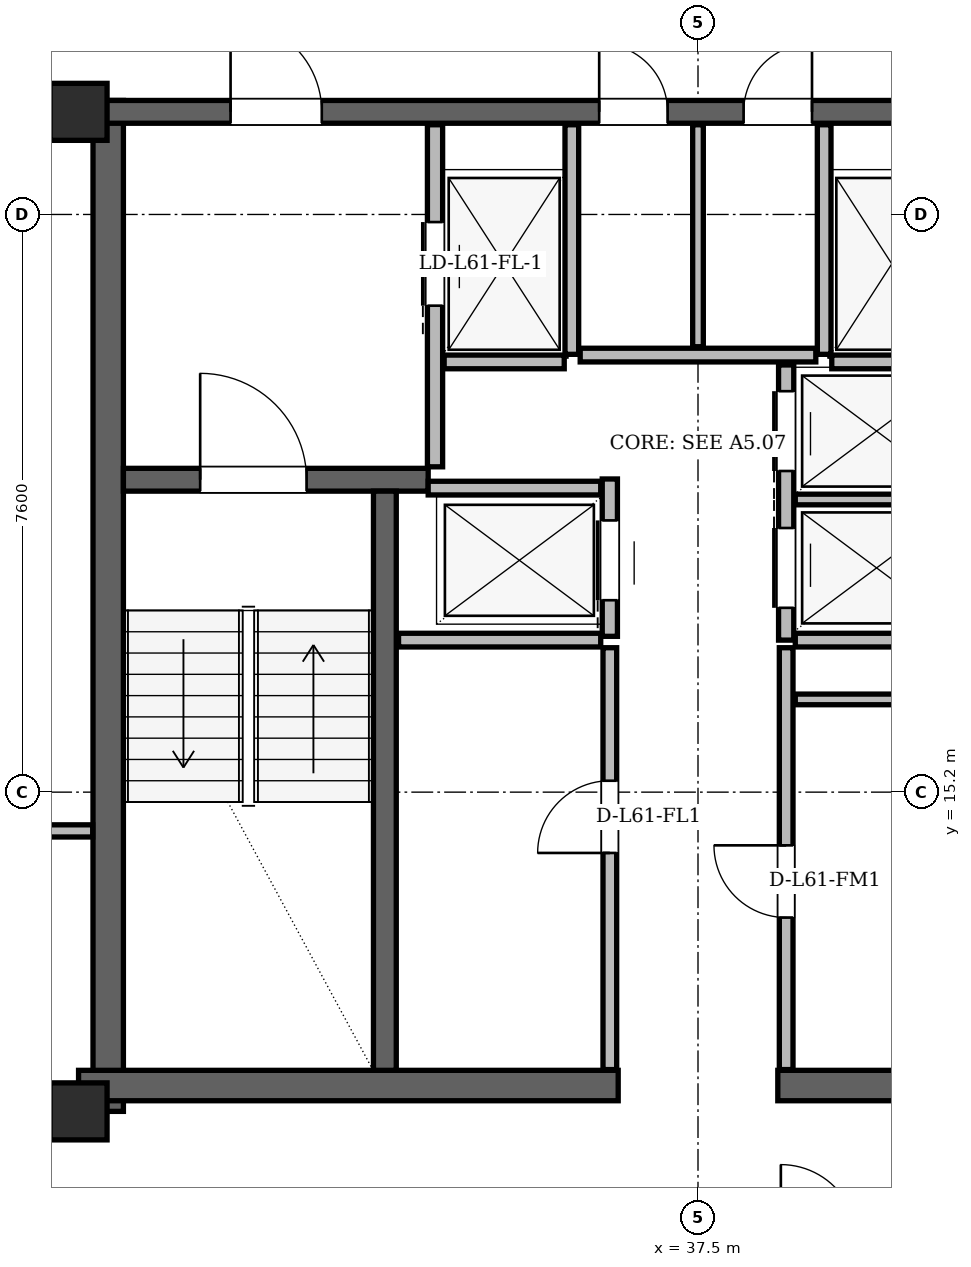
"""IFC4 building model, lengths in metres.
Left out: names, types, materials, properties, quantities, classifications, styles, units other than length and angle.
Written with IfcOpenShell. Run it as: python <this file> out.ifc"""

import sys

from ifc_helpers import new_model, si_unit, direction, frame, frame_2d, origin, origin_2d, place, context, subcontext, project, spatial, rectangle, hollow_rectangle, extrude, element, fill, save


model = new_model("IFC4")
c1 = context("Model", 3, precision=1e-05, world=origin(), true_north=direction((0.0, 1.0)))
c2 = subcontext(c1, "Body", "Model", "MODEL_VIEW")
j1 = project(units=[si_unit("LENGTHUNIT", "METRE"), si_unit("PLANEANGLEUNIT", "RADIAN")], contexts=[c1])
p1 = place(None, origin())
s1 = spatial("IfcSite", under=j1, at=p1, CompositionType="ELEMENT")
p2 = place(p1, origin())
s2 = spatial("IfcBuilding", under=s1, at=p2, CompositionType="ELEMENT")
p3 = place(p2, frame((0.0, 0.0, 230.7)))
s3 = spatial("IfcBuildingStorey", under=s2, at=p3, CompositionType="ELEMENT", Elevation=230.7)
for number, where, z_axis, x_axis in (
    (1, (29.35, 11.0, 0.0), (0.0, 0.0, 1.0), (1.0, 0.0, 0.0)),
    (2, (29.35, 24.15, 0.0), (0.0, 0.0, 1.0), (1.0, 0.0, 0.0)),
):
    element("IfcColumn", number, at=place(p3, frame(where, z_axis=z_axis, x_axis=x_axis)), inside=s3, PredefinedType="COLUMN", context=c2, shape_type="SweptSolid", body=[
        extrude(hollow_rectangle(XDim=0.75, YDim=0.75, WallThickness=0.06, at=origin_2d()), origin(), (0.0, 0.0, 1.0), 3.6),
    ])
p4 = place(p3, frame((29.74, 11.0, 0.0), z_axis=(0.0, 0.0, 1.0), x_axis=(0.0, 1.0, 0.0)))
e3 = element("IfcWall", 3, at=p4, inside=s3, PredefinedType="SHEAR", context=c2, shape_type="SweptSolid", body=[
    extrude(rectangle(XDim=13.3, YDim=0.4, at=frame_2d((6.65, 0.0))), origin(), (0.0, 0.0, 1.0), 3.38),
])
for number, where, z_axis, x_axis in (
    (4, (29.35, 11.34, 0.0), (0.0, 0.0, 1.0), (1.0, 0.0, 0.0)),
    (5, (38.55, 11.34, 0.0), (0.0, 0.0, 1.0), (1.0, 0.0, 0.0)),
):
    element("IfcWall", number, at=place(p3, frame(where, z_axis=z_axis, x_axis=x_axis)), inside=s3, PredefinedType="SHEAR", context=c2, shape_type="SweptSolid", body=[
        extrude(rectangle(XDim=7.1, YDim=0.4, at=frame_2d((3.55, 0.0))), origin(), (0.0, 0.0, 1.0), 3.38),
    ])
p5 = place(p3, frame((29.65, 24.15, 0.0), z_axis=(0.0, 0.0, 1.0), x_axis=(1.0, 0.0, 0.0)))
e6 = element("IfcWall", 6, at=p5, inside=s3, PredefinedType="SHEAR", context=c2, shape_type="SweptSolid", body=[
    extrude(rectangle(XDim=15.7, YDim=0.3, at=frame_2d((7.85, 0.0))), origin(), (0.0, 0.0, 1.0), 3.38),
])
p6 = place(p5, frame((1.7, 0.0, 0.0)))
e7 = element("IfcOpeningElement", 7, at=p6, cuts=e6, PredefinedType="OPENING", context=c2, shape_type="SweptSolid", body=[
    extrude(rectangle(XDim=1.2, YDim=2.2, at=frame_2d((0.6, 1.1))), frame((0.0, 0.15, 0.0), z_axis=(0.0, -1.0, 0.0), x_axis=(1.0, 0.0, 0.0)), (0.0, 0.0, 1.0), 0.3),
])
p7 = place(p5, frame((12.8, 0.0, 0.0)))
e8 = element("IfcOpeningElement", 8, at=p7, cuts=e6, PredefinedType="OPENING", context=c2, shape_type="SweptSolid", body=[
    extrude(rectangle(XDim=1.2, YDim=2.2, at=frame_2d((0.6, 1.1))), frame((0.0, 0.15, 0.0), z_axis=(0.0, -1.0, 0.0), x_axis=(1.0, 0.0, 0.0)), (0.0, 0.0, 1.0), 0.3),
])
p8 = place(p5, frame((6.55, 0.0, 0.0)))
e9 = element("IfcOpeningElement", 9, at=p8, cuts=e6, PredefinedType="OPENING", context=c2, shape_type="SweptSolid", body=[
    extrude(rectangle(XDim=0.9, YDim=2.05, at=frame_2d((0.45, 1.025))), frame((0.0, 0.15, 0.0), z_axis=(0.0, -1.0, 0.0), x_axis=(1.0, 0.0, 0.0)), (0.0, 0.0, 1.0), 0.3),
])
p9 = place(p5, frame((8.45, 0.0, 0.0)))
e10 = element("IfcOpeningElement", 10, at=p9, cuts=e6, PredefinedType="OPENING", context=c2, shape_type="SweptSolid", body=[
    extrude(rectangle(XDim=0.9, YDim=2.05, at=frame_2d((0.45, 1.025))), frame((0.0, 0.15, 0.0), z_axis=(0.0, -1.0, 0.0), x_axis=(1.0, 0.0, 0.0)), (0.0, 0.0, 1.0), 0.3),
])
p10 = place(p3, frame((29.94, 19.31, 0.0), z_axis=(0.0, 0.0, 1.0), x_axis=(1.0, 0.0, 0.0)))
e11 = element("IfcWall", 11, at=p10, inside=s3, PredefinedType="SHEAR", context=c2, shape_type="SweptSolid", body=[
    extrude(rectangle(XDim=4.01, YDim=0.3, at=frame_2d((2.005, 0.0))), origin(), (0.0, 0.0, 1.0), 3.38),
])
p11 = place(p10, frame((1.01, 0.0, 0.0)))
e12 = element("IfcOpeningElement", 12, at=p11, cuts=e11, PredefinedType="OPENING", context=c2, shape_type="SweptSolid", body=[
    extrude(rectangle(XDim=1.4, YDim=2.2, at=frame_2d((0.7, 1.1))), frame((0.0, 0.15, 0.0), z_axis=(0.0, -1.0, 0.0), x_axis=(1.0, 0.0, 0.0)), (0.0, 0.0, 1.0), 0.3),
])
p12 = place(p3, frame((33.38, 11.54, 0.0), z_axis=(0.0, 0.0, 1.0), x_axis=(0.0, 1.0, 0.0)))
e13 = element("IfcWall", 13, at=p12, inside=s3, PredefinedType="SHEAR", context=c2, shape_type="SweptSolid", body=[
    extrude(rectangle(XDim=7.62, YDim=0.3, at=frame_2d((3.81, 0.0))), origin(), (0.0, 0.0, 1.0), 3.38),
])
p13 = place(p3, frame((34.414, 43.126, 0.0), z_axis=(0.0, 0.0, 1.0), x_axis=(-0.50000331183, -0.86602349169, 0.0)))
e14 = element("IfcWall", 14, at=p13, inside=s3, PredefinedType="SOLIDWALL", context=c2, shape_type="SweptSolid", body=[
    extrude(rectangle(XDim=36.795, YDim=0.29, at=frame_2d((18.397, 0.0))), origin(), (0.0, 0.0, 1.0), 2.677),
])
p14 = place(p13, frame((3.529, 0.0, 0.0)))
e15 = element("IfcOpeningElement", 15, at=p14, cuts=e14, PredefinedType="OPENING", context=c2, shape_type="SweptSolid", body=[
    extrude(rectangle(XDim=1.3, YDim=2.2, at=frame_2d((0.65, 1.1))), frame((0.0, 0.145, 0.0), z_axis=(0.0, -1.0, 0.0), x_axis=(1.0, 0.0, 0.0)), (0.0, 0.0, 1.0), 0.29),
])
p15 = place(p13, frame((27.261, 0.0, 0.0)))
e16 = element("IfcOpeningElement", 16, at=p15, cuts=e14, PredefinedType="OPENING", context=c2, shape_type="SweptSolid", body=[
    extrude(rectangle(XDim=1.5, YDim=2.2, at=frame_2d((0.75, 1.1))), frame((0.0, 0.145, 0.0), z_axis=(0.0, -1.0, 0.0), x_axis=(1.0, 0.0, 0.0)), (0.0, 0.0, 1.0), 0.29),
])
p16 = place(p13, frame((22.271, 0.0, 0.85)))
e17 = element("IfcOpeningElement", 17, at=p16, cuts=e14, PredefinedType="OPENING", context=c2, shape_type="SweptSolid", body=[
    extrude(rectangle(XDim=2.4, YDim=1.717, at=frame_2d((1.2, 0.858))), frame((0.0, 0.145, 0.0), z_axis=(0.0, -1.0, 0.0), x_axis=(1.0, 0.0, 0.0)), (0.0, 0.0, 1.0), 0.29),
])
p17 = place(p13, frame((33.406, 0.0, 0.85)))
e18 = element("IfcOpeningElement", 18, at=p17, cuts=e14, PredefinedType="OPENING", context=c2, shape_type="SweptSolid", body=[
    extrude(rectangle(XDim=2.2, YDim=1.717, at=frame_2d((1.1, 0.858))), frame((0.0, 0.145, 0.0), z_axis=(0.0, -1.0, 0.0), x_axis=(1.0, 0.0, 0.0)), (0.0, 0.0, 1.0), 0.29),
])
p18 = place(p13, frame((11.662, 0.0, 0.85)))
e19 = element("IfcOpeningElement", 19, at=p18, cuts=e14, PredefinedType="OPENING", context=c2, shape_type="SweptSolid", body=[
    extrude(rectangle(XDim=1.2, YDim=1.48, at=frame_2d((0.6, 0.74))), frame((0.0, 0.145, 0.0), z_axis=(0.0, -1.0, 0.0), x_axis=(1.0, 0.0, 0.0)), (0.0, 0.0, 1.0), 0.29),
])
p19 = place(p13, frame((16.295, 0.0, 0.85)))
e20 = element("IfcOpeningElement", 20, at=p19, cuts=e14, PredefinedType="OPENING", context=c2, shape_type="SweptSolid", body=[
    extrude(rectangle(XDim=1.8, YDim=1.717, at=frame_2d((0.9, 0.858))), frame((0.0, 0.145, 0.0), z_axis=(0.0, -1.0, 0.0), x_axis=(1.0, 0.0, 0.0)), (0.0, 0.0, 1.0), 0.29),
])
p20 = place(p3, frame((34.04, 19.48, 0.0), z_axis=(0.0, 0.0, 1.0), x_axis=(0.0, 1.0, 0.0)))
e21 = element("IfcWall", 21, at=p20, inside=s3, PredefinedType="PARTITIONING", context=c2, shape_type="SweptSolid", body=[
    extrude(rectangle(XDim=4.5, YDim=0.2, at=frame_2d((2.25, 0.0))), origin(), (0.0, 0.0, 1.0), 3.38),
])
p21 = place(p20, frame((2.12, 0.0, 0.0)))
e22 = element("IfcOpeningElement", 22, at=p21, cuts=e21, PredefinedType="OPENING", context=c2, shape_type="SweptSolid", body=[
    extrude(rectangle(XDim=1.1, YDim=2.2, at=frame_2d((0.55, 1.1))), frame((0.0, 0.1, 0.0), z_axis=(0.0, -1.0, 0.0), x_axis=(1.0, 0.0, 0.0)), (0.0, 0.0, 1.0), 0.2),
])
p22 = place(p3, frame((35.84, 20.96, 0.0), z_axis=(0.0, 0.0, 1.0), x_axis=(0.0, 1.0, 0.0)))
e23 = element("IfcWall", 23, at=p22, inside=s3, PredefinedType="PARTITIONING", context=c2, shape_type="SweptSolid", body=[
    extrude(rectangle(XDim=3.02, YDim=0.18, at=frame_2d((1.51, 0.0))), origin(), (0.0, 0.0, 1.0), 3.38),
])
p23 = place(p3, frame((34.16, 20.86, 0.0), z_axis=(0.0, 0.0, 1.0), x_axis=(1.0, 0.0, 0.0)))
e24 = element("IfcWall", 24, at=p23, inside=s3, PredefinedType="PARTITIONING", context=c2, shape_type="SweptSolid", body=[
    extrude(rectangle(XDim=1.58, YDim=0.18, at=frame_2d((0.79, 0.0))), origin(), (0.0, 0.0, 1.0), 3.38),
])
p24 = place(p3, frame((39.16, 20.96, 0.0), z_axis=(0.0, 0.0, 1.0), x_axis=(0.0, 1.0, 0.0)))
e25 = element("IfcWall", 25, at=p24, inside=s3, PredefinedType="PARTITIONING", context=c2, shape_type="SweptSolid", body=[
    extrude(rectangle(XDim=3.02, YDim=0.18, at=frame_2d((1.51, 0.0))), origin(), (0.0, 0.0, 1.0), 3.38),
])
p25 = place(p3, frame((39.26, 20.86, 0.0), z_axis=(0.0, 0.0, 1.0), x_axis=(1.0, 0.0, 0.0)))
e26 = element("IfcWall", 26, at=p25, inside=s3, PredefinedType="PARTITIONING", context=c2, shape_type="SweptSolid", body=[
    extrude(rectangle(XDim=1.58, YDim=0.18, at=frame_2d((0.79, 0.0))), origin(), (0.0, 0.0, 1.0), 3.38),
])
p26 = place(p3, frame((36.34, 17.25, 0.0), z_axis=(0.0, 0.0, 1.0), x_axis=(0.0, 1.0, 0.0)))
e27 = element("IfcWall", 27, at=p26, inside=s3, PredefinedType="PARTITIONING", context=c2, shape_type="SweptSolid", body=[
    extrude(rectangle(XDim=2.07, YDim=0.2, at=frame_2d((1.035, 0.0))), origin(), (0.0, 0.0, 1.0), 3.38),
])
p27 = place(p26, frame((0.475, 0.0, 0.0)))
e28 = element("IfcOpeningElement", 28, at=p27, cuts=e27, PredefinedType="OPENING", context=c2, shape_type="SweptSolid", body=[
    extrude(rectangle(XDim=1.05, YDim=2.15, at=frame_2d((0.525, 1.075))), frame((0.0, 0.1, 0.0), z_axis=(0.0, -1.0, 0.0), x_axis=(1.0, 0.0, 0.0)), (0.0, 0.0, 1.0), 0.2),
])
p28 = place(p3, frame((33.95, 19.2, 0.0), z_axis=(0.0, 0.0, 1.0), x_axis=(1.0, 0.0, 0.0)))
e29 = element("IfcWall", 29, at=p28, inside=s3, PredefinedType="PARTITIONING", context=c2, shape_type="SweptSolid", body=[
    extrude(rectangle(XDim=2.27, YDim=0.18, at=frame_2d((1.135, 0.0))), origin(), (0.0, 0.0, 1.0), 3.38),
])
p29 = place(p3, frame((33.56, 17.2, 0.0), z_axis=(0.0, 0.0, 1.0), x_axis=(1.0, 0.0, 0.0)))
e30 = element("IfcWall", 30, at=p29, inside=s3, PredefinedType="PARTITIONING", context=c2, shape_type="SweptSolid", body=[
    extrude(rectangle(XDim=2.66, YDim=0.18, at=frame_2d((1.33, 0.0))), origin(), (0.0, 0.0, 1.0), 3.38),
])
p30 = place(p3, frame((36.34, 11.55, 0.0), z_axis=(0.0, 0.0, 1.0), x_axis=(0.0, 1.0, 0.0)))
e31 = element("IfcWall", 31, at=p30, inside=s3, PredefinedType="PARTITIONING", context=c2, shape_type="SweptSolid", body=[
    extrude(rectangle(XDim=5.55, YDim=0.18, at=frame_2d((2.775, 0.0))), origin(), (0.0, 0.0, 1.0), 3.38),
])
p31 = place(p30, frame((2.85, 0.0, 0.0)))
e32 = element("IfcOpeningElement", 32, at=p31, cuts=e31, PredefinedType="OPENING", context=c2, shape_type="SweptSolid", body=[
    extrude(rectangle(XDim=0.95, YDim=2.1, at=frame_2d((0.475, 1.05))), frame((0.0, 0.09, 0.0), z_axis=(0.0, -1.0, 0.0), x_axis=(1.0, 0.0, 0.0)), (0.0, 0.0, 1.0), 0.18),
])
p32 = place(p3, frame((38.66, 17.2, 0.0), z_axis=(0.0, 0.0, 1.0), x_axis=(0.0, 1.0, 0.0)))
e33 = element("IfcWall", 33, at=p32, inside=s3, PredefinedType="PARTITIONING", context=c2, shape_type="SweptSolid", body=[
    extrude(rectangle(XDim=3.62, YDim=0.2, at=frame_2d((1.81, 0.0))), origin(), (0.0, 0.0, 1.0), 3.38),
])
p33 = place(p32, frame((0.425, 0.0, 0.0)))
e34 = element("IfcOpeningElement", 34, at=p33, cuts=e33, PredefinedType="OPENING", context=c2, shape_type="SweptSolid", body=[
    extrude(rectangle(XDim=1.05, YDim=2.15, at=frame_2d((0.525, 1.075))), frame((0.0, 0.1, 0.0), z_axis=(0.0, -1.0, 0.0), x_axis=(1.0, 0.0, 0.0)), (0.0, 0.0, 1.0), 0.2),
])
p34 = place(p32, frame((2.225, 0.0, 0.0)))
e35 = element("IfcOpeningElement", 35, at=p34, cuts=e33, PredefinedType="OPENING", context=c2, shape_type="SweptSolid", body=[
    extrude(rectangle(XDim=1.05, YDim=2.15, at=frame_2d((0.525, 1.075))), frame((0.0, 0.1, 0.0), z_axis=(0.0, -1.0, 0.0), x_axis=(1.0, 0.0, 0.0)), (0.0, 0.0, 1.0), 0.2),
])
p35 = place(p3, frame((38.78, 17.2, 0.0), z_axis=(0.0, 0.0, 1.0), x_axis=(1.0, 0.0, 0.0)))
e36 = element("IfcWall", 36, at=p35, inside=s3, PredefinedType="PARTITIONING", context=c2, shape_type="SweptSolid", body=[
    extrude(rectangle(XDim=2.66, YDim=0.18, at=frame_2d((1.33, 0.0))), origin(), (0.0, 0.0, 1.0), 3.38),
])
p36 = place(p3, frame((38.78, 19.05, 0.0), z_axis=(0.0, 0.0, 1.0), x_axis=(1.0, 0.0, 0.0)))
e37 = element("IfcWall", 37, at=p36, inside=s3, PredefinedType="PARTITIONING", context=c2, shape_type="SweptSolid", body=[
    extrude(rectangle(XDim=2.66, YDim=0.14, at=frame_2d((1.33, 0.0))), origin(), (0.0, 0.0, 1.0), 3.38),
])
p37 = place(p3, frame((38.66, 11.55, 0.0), z_axis=(0.0, 0.0, 1.0), x_axis=(0.0, 1.0, 0.0)))
e38 = element("IfcWall", 38, at=p37, inside=s3, PredefinedType="PARTITIONING", context=c2, shape_type="SweptSolid", body=[
    extrude(rectangle(XDim=5.55, YDim=0.18, at=frame_2d((2.775, 0.0))), origin(), (0.0, 0.0, 1.0), 3.38),
])
p38 = place(p37, frame((2.0, 0.0, 0.0)))
e39 = element("IfcOpeningElement", 39, at=p38, cuts=e38, PredefinedType="OPENING", context=c2, shape_type="SweptSolid", body=[
    extrude(rectangle(XDim=0.95, YDim=2.1, at=frame_2d((0.475, 1.05))), frame((0.0, 0.09, 0.0), z_axis=(0.0, -1.0, 0.0), x_axis=(1.0, 0.0, 0.0)), (0.0, 0.0, 1.0), 0.18),
])
p39 = place(p3, frame((38.78, 16.42, 0.0), z_axis=(0.0, 0.0, 1.0), x_axis=(1.0, 0.0, 0.0)))
e40 = element("IfcWall", 40, at=p39, inside=s3, PredefinedType="PARTITIONING", context=c2, shape_type="SweptSolid", body=[
    extrude(rectangle(XDim=2.66, YDim=0.14, at=frame_2d((1.33, 0.0))), origin(), (0.0, 0.0, 1.0), 3.38),
])
p40 = place(p3, frame((35.95, 20.95, 0.0), z_axis=(0.0, 0.0, 1.0), x_axis=(1.0, 0.0, 0.0)))
e41 = element("IfcWall", 41, at=p40, inside=s3, PredefinedType="PARTITIONING", context=c2, shape_type="SweptSolid", body=[
    extrude(rectangle(XDim=3.1, YDim=0.18, at=frame_2d((1.55, 0.0))), origin(), (0.0, 0.0, 1.0), 3.38),
])
p41 = place(p3, frame((37.5, 21.06, 0.0), z_axis=(0.0, 0.0, 1.0), x_axis=(0.0, 1.0, 0.0)))
e42 = element("IfcWall", 42, at=p41, inside=s3, PredefinedType="PARTITIONING", context=c2, shape_type="SweptSolid", body=[
    extrude(rectangle(XDim=2.92, YDim=0.14, at=frame_2d((1.46, 0.0))), origin(), (0.0, 0.0, 1.0), 3.38),
])
p42 = place(p3, frame((18.168, 14.69, 0.0), z_axis=(0.0, 0.0, 1.0), x_axis=(1.0, 0.0, 0.0)))
e43 = element("IfcWall", 43, at=p42, inside=s3, PredefinedType="PARTITIONING", context=c2, shape_type="SweptSolid", body=[
    extrude(rectangle(XDim=11.368, YDim=0.16, at=frame_2d((5.684, 0.0))), origin(), (0.0, 0.0, 1.0), 2.52),
])
p43 = place(p42, frame((0.493, 0.0, 0.0)))
e44 = element("IfcOpeningElement", 44, at=p43, cuts=e43, PredefinedType="OPENING", context=c2, shape_type="SweptSolid", body=[
    extrude(rectangle(XDim=0.88, YDim=2.08, at=frame_2d((0.44, 1.04))), frame((0.0, 0.08, 0.0), z_axis=(0.0, -1.0, 0.0), x_axis=(1.0, 0.0, 0.0)), (0.0, 0.0, 1.0), 0.16),
])
p44 = place(p42, frame((2.443, 0.0, 0.0)))
e45 = element("IfcOpeningElement", 45, at=p44, cuts=e43, PredefinedType="OPENING", context=c2, shape_type="SweptSolid", body=[
    extrude(rectangle(XDim=0.95, YDim=2.1, at=frame_2d((0.475, 1.05))), frame((0.0, 0.08, 0.0), z_axis=(0.0, -1.0, 0.0), x_axis=(1.0, 0.0, 0.0)), (0.0, 0.0, 1.0), 0.16),
])
p45 = place(p42, frame((7.232, 0.0, 0.0)))
e46 = element("IfcOpeningElement", 46, at=p45, cuts=e43, PredefinedType="OPENING", context=c2, shape_type="SweptSolid", body=[
    extrude(rectangle(XDim=0.92, YDim=2.12, at=frame_2d((0.46, 1.06))), frame((0.0, 0.08, 0.0), z_axis=(0.0, -1.0, 0.0), x_axis=(1.0, 0.0, 0.0)), (0.0, 0.0, 1.0), 0.16),
])
p46 = place(p31, origin())
e47 = element("IfcDoor", 47, at=p46, inside=s3, OperationType="SINGLE_SWING_LEFT", PredefinedType="DOOR", context=c2, shape_type="SweptSolid", body=[
    extrude(rectangle(XDim=0.95, YDim=2.1, at=frame_2d((0.475, 1.05))), frame((0.0, 0.025, 0.0), z_axis=(0.0, -1.0, 0.0), x_axis=(1.0, 0.0, 0.0)), (0.0, 0.0, 1.0), 0.05),
])
fill(e32, e47)
p47 = place(p38, origin())
e48 = element("IfcDoor", 48, at=p47, inside=s3, OperationType="SINGLE_SWING_RIGHT", PredefinedType="DOOR", context=c2, shape_type="SweptSolid", body=[
    extrude(rectangle(XDim=0.95, YDim=2.1, at=frame_2d((0.475, 1.05))), frame((0.0, 0.025, 0.0), z_axis=(0.0, -1.0, 0.0), x_axis=(1.0, 0.0, 0.0)), (0.0, 0.0, 1.0), 0.05),
])
fill(e39, e48)
p48 = place(p21, origin())
e49 = element("IfcDoor", 49, at=p48, inside=s3, OperationType="SLIDING_TO_LEFT", PredefinedType="DOOR", context=c2, shape_type="SweptSolid", body=[
    extrude(rectangle(XDim=1.1, YDim=2.2, at=frame_2d((0.55, 1.1))), frame((0.0, 0.025, 0.0), z_axis=(0.0, -1.0, 0.0), x_axis=(1.0, 0.0, 0.0)), (0.0, 0.0, 1.0), 0.05),
])
fill(e22, e49)
p49 = place(p27, origin())
e50 = element("IfcDoor", 50, at=p49, inside=s3, OperationType="SLIDING_TO_LEFT", PredefinedType="DOOR", context=c2, shape_type="SweptSolid", body=[
    extrude(rectangle(XDim=1.05, YDim=2.15, at=frame_2d((0.525, 1.075))), frame((0.0, 0.025, 0.0), z_axis=(0.0, -1.0, 0.0), x_axis=(1.0, 0.0, 0.0)), (0.0, 0.0, 1.0), 0.05),
])
fill(e28, e50)
p50 = place(p33, origin())
e51 = element("IfcDoor", 51, at=p50, inside=s3, OperationType="SLIDING_TO_RIGHT", PredefinedType="DOOR", context=c2, shape_type="SweptSolid", body=[
    extrude(rectangle(XDim=1.05, YDim=2.15, at=frame_2d((0.525, 1.075))), frame((0.0, 0.025, 0.0), z_axis=(0.0, -1.0, 0.0), x_axis=(1.0, 0.0, 0.0)), (0.0, 0.0, 1.0), 0.05),
])
fill(e34, e51)
p51 = place(p34, origin())
e52 = element("IfcDoor", 52, at=p51, inside=s3, OperationType="SLIDING_TO_LEFT", PredefinedType="DOOR", context=c2, shape_type="SweptSolid", body=[
    extrude(rectangle(XDim=1.05, YDim=2.15, at=frame_2d((0.525, 1.075))), frame((0.0, 0.025, 0.0), z_axis=(0.0, -1.0, 0.0), x_axis=(1.0, 0.0, 0.0)), (0.0, 0.0, 1.0), 0.05),
])
fill(e35, e52)
p52 = place(p11, origin())
e53 = element("IfcDoor", 53, at=p52, inside=s3, OperationType="SINGLE_SWING_LEFT", PredefinedType="DOOR", context=c2, shape_type="SweptSolid", body=[
    extrude(rectangle(XDim=1.4, YDim=2.2, at=frame_2d((0.7, 1.1))), frame((0.0, 0.025, 0.0), z_axis=(0.0, -1.0, 0.0), x_axis=(1.0, 0.0, 0.0)), (0.0, 0.0, 1.0), 0.05),
])
fill(e12, e53)
p53 = place(p6, origin())
e54 = element("IfcDoor", 54, at=p53, inside=s3, OperationType="SINGLE_SWING_LEFT", PredefinedType="DOOR", context=c2, shape_type="SweptSolid", body=[
    extrude(rectangle(XDim=1.2, YDim=2.2, at=frame_2d((0.6, 1.1))), frame((0.0, 0.025, 0.0), z_axis=(0.0, -1.0, 0.0), x_axis=(1.0, 0.0, 0.0)), (0.0, 0.0, 1.0), 0.05),
])
fill(e7, e54)
p54 = place(p8, origin())
e55 = element("IfcDoor", 55, at=p54, inside=s3, OperationType="SINGLE_SWING_LEFT", PredefinedType="DOOR", context=c2, shape_type="SweptSolid", body=[
    extrude(rectangle(XDim=0.9, YDim=2.05, at=frame_2d((0.45, 1.025))), frame((0.0, 0.025, 0.0), z_axis=(0.0, -1.0, 0.0), x_axis=(1.0, 0.0, 0.0)), (0.0, 0.0, 1.0), 0.05),
])
fill(e9, e55)
p55 = place(p9, origin())
e56 = element("IfcDoor", 56, at=p55, inside=s3, OperationType="SINGLE_SWING_RIGHT", PredefinedType="DOOR", context=c2, shape_type="SweptSolid", body=[
    extrude(rectangle(XDim=0.9, YDim=2.05, at=frame_2d((0.45, 1.025))), frame((0.0, 0.025, 0.0), z_axis=(0.0, -1.0, 0.0), x_axis=(1.0, 0.0, 0.0)), (0.0, 0.0, 1.0), 0.05),
])
fill(e10, e56)
save(model, sys.argv[1])
